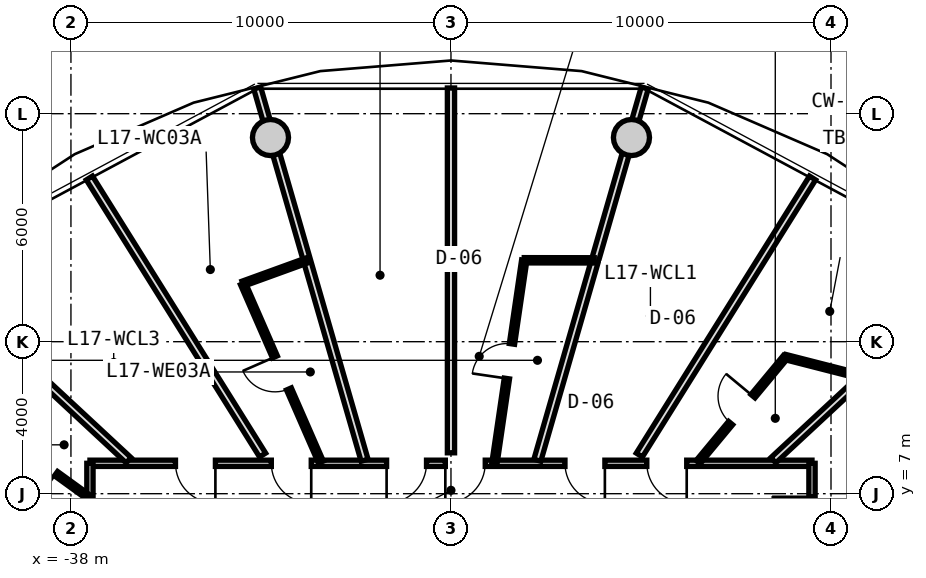
"""IFC4 building model, lengths in metres.
Left out: names, types, materials, properties, quantities, classifications, styles, units other than length and angle.
Written with IfcOpenShell. Run it as: python <this file> out.ifc"""

import sys

from ifc_helpers import new_model, si_unit, direction, frame, frame_2d, origin, origin_2d, place, context, subcontext, project, spatial, rectangle, circle, extrude, source, transform, mapped, element, fill, save


model = new_model("IFC4")
c1 = context("Model", 3, precision=1e-05, world=origin(), true_north=direction((0.0, 1.0)))
c2 = subcontext(c1, "Body", "Model", "MODEL_VIEW")
j1 = project(units=[si_unit("LENGTHUNIT", "METRE"), si_unit("PLANEANGLEUNIT", "RADIAN")], contexts=[c1])
p1 = place(None, origin())
s1 = spatial("IfcSite", under=j1, at=p1, CompositionType="ELEMENT")
p2 = place(p1, origin())
s2 = spatial("IfcBuilding", under=s1, at=p2, CompositionType="ELEMENT")
p3 = place(p2, frame((0.0, 0.0, 58.2)))
s3 = spatial("IfcBuildingStorey", under=s2, at=p3, CompositionType="ELEMENT", Elevation=58.2)
m1 = source(origin(), c2, "Body", "SweptSolid", [
    extrude(circle(Radius=0.475, at=origin_2d()), origin(), (0.0, 0.0, 1.0), 3.05),
])
for number, where, z_axis, x_axis in (
    (1, (-23.251, 16.373, 0.0), (0.0, 0.0, 1.0), (1.0, 0.0, 0.0)),
    (2, (-32.749, 16.373, 0.0), (0.0, 0.0, 1.0), (1.0, 0.0, 0.0)),
):
    element("IfcColumn", number, at=place(p3, frame(where, z_axis=z_axis, x_axis=x_axis)), inside=s3, PredefinedType="COLUMN", context=c2, shape_type="MappedRepresentation", body=[
        mapped(m1, transform((0.0, 0.0, 0.0), x_axis=(1.0, 0.0, 0.0), y_axis=(0.0, 1.0, 0.0), z_axis=(0.0, 0.0, 1.0), scale=1.0)),
    ])
m2 = source(origin(), c2, "Body", "SweptSolid", [
    extrude(rectangle(XDim=19.0, YDim=0.165, at=frame_2d((9.5, 0.0))), origin(), (0.0, 0.0, 1.0), 2.775),
])
p4 = place(p3, frame((-37.5, 7.8, 0.0), z_axis=(0.0, 0.0, 1.0), x_axis=(1.0, 0.0, 0.0)))
e3 = element("IfcWall", 3, at=p4, inside=s3, PredefinedType="PARTITIONING", context=c2, shape_type="MappedRepresentation", body=[
    mapped(m2, transform((0.0, 0.0, 0.0), x_axis=(1.0, 0.0, 0.0), y_axis=(0.0, 1.0, 0.0), z_axis=(0.0, 0.0, 1.0), scale=1.0)),
])
p5 = place(p4, frame((14.653, 0.0, 0.0)))
e4 = element("IfcOpeningElement", 4, at=p5, cuts=e3, PredefinedType="OPENING", context=c2, shape_type="SweptSolid", body=[
    extrude(rectangle(XDim=1.05, YDim=2.15, at=frame_2d((0.525, 1.075))), frame((0.0, 0.093, 0.0), z_axis=(0.0, -1.0, 0.0), x_axis=(1.0, 0.0, 0.0)), (0.0, 0.0, 1.0), 0.185),
])
p6 = place(p4, frame((12.5, 0.0, 0.0)))
e5 = element("IfcOpeningElement", 5, at=p6, cuts=e3, PredefinedType="OPENING", context=c2, shape_type="SweptSolid", body=[
    extrude(rectangle(XDim=1.05, YDim=2.15, at=frame_2d((0.525, 1.075))), frame((0.0, 0.093, 0.0), z_axis=(0.0, -1.0, 0.0), x_axis=(1.0, 0.0, 0.0)), (0.0, 0.0, 1.0), 0.185),
])
p7 = place(p4, frame((9.352, 0.0, 0.0)))
e6 = element("IfcOpeningElement", 6, at=p7, cuts=e3, PredefinedType="OPENING", context=c2, shape_type="SweptSolid", body=[
    extrude(rectangle(XDim=1.05, YDim=2.15, at=frame_2d((0.525, 1.075))), frame((0.0, 0.093, 0.0), z_axis=(0.0, -1.0, 0.0), x_axis=(1.0, 0.0, 0.0)), (0.0, 0.0, 1.0), 0.185),
])
p8 = place(p4, frame((7.806, 0.0, 0.0)))
e7 = element("IfcOpeningElement", 7, at=p8, cuts=e3, PredefinedType="OPENING", context=c2, shape_type="SweptSolid", body=[
    extrude(rectangle(XDim=1.05, YDim=2.15, at=frame_2d((0.525, 1.075))), frame((0.0, 0.093, 0.0), z_axis=(0.0, -1.0, 0.0), x_axis=(1.0, 0.0, 0.0)), (0.0, 0.0, 1.0), 0.185),
])
p9 = place(p4, frame((4.773, 0.0, 0.0)))
e8 = element("IfcOpeningElement", 8, at=p9, cuts=e3, PredefinedType="OPENING", context=c2, shape_type="SweptSolid", body=[
    extrude(rectangle(XDim=1.05, YDim=2.15, at=frame_2d((0.525, 1.075))), frame((0.0, 0.093, 0.0), z_axis=(0.0, -1.0, 0.0), x_axis=(1.0, 0.0, 0.0)), (0.0, 0.0, 1.0), 0.185),
])
p10 = place(p4, frame((2.251, 0.0, 0.0)))
e9 = element("IfcOpeningElement", 9, at=p10, cuts=e3, PredefinedType="OPENING", context=c2, shape_type="SweptSolid", body=[
    extrude(rectangle(XDim=1.05, YDim=2.15, at=frame_2d((0.525, 1.075))), frame((0.0, 0.093, 0.0), z_axis=(0.0, -1.0, 0.0), x_axis=(1.0, 0.0, 0.0)), (0.0, 0.0, 1.0), 0.185),
])
m3 = source(origin(), c2, "Body", "SweptSolid", [
    extrude(rectangle(XDim=15.6, YDim=0.165, at=frame_2d((7.8, 0.0))), origin(), (0.0, 0.0, 1.0), 2.775),
])
p11 = place(p3, frame((-37.5, -7.8, 0.0), z_axis=(0.0, 0.0, 1.0), x_axis=(0.0, 1.0, 0.0)))
e10 = element("IfcWall", 10, at=p11, inside=s3, PredefinedType="PARTITIONING", context=c2, shape_type="MappedRepresentation", body=[
    mapped(m3, transform((0.0, 0.0, 0.0), x_axis=(1.0, 0.0, 0.0), y_axis=(0.0, 1.0, 0.0), z_axis=(0.0, 0.0, 1.0), scale=1.0)),
])
p12 = place(p11, frame((7.812, 0.0, 0.0)))
e11 = element("IfcOpeningElement", 11, at=p12, cuts=e10, PredefinedType="OPENING", context=c2, shape_type="SweptSolid", body=[
    extrude(rectangle(XDim=1.05, YDim=2.15, at=frame_2d((0.525, 1.075))), frame((0.0, 0.093, 0.0), z_axis=(0.0, -1.0, 0.0), x_axis=(1.0, 0.0, 0.0)), (0.0, 0.0, 1.0), 0.185),
])
p13 = place(p11, frame((6.035, 0.0, 0.0)))
e12 = element("IfcOpeningElement", 12, at=p13, cuts=e10, PredefinedType="OPENING", context=c2, shape_type="SweptSolid", body=[
    extrude(rectangle(XDim=1.05, YDim=2.15, at=frame_2d((0.525, 1.075))), frame((0.0, 0.093, 0.0), z_axis=(0.0, -1.0, 0.0), x_axis=(1.0, 0.0, 0.0)), (0.0, 0.0, 1.0), 0.185),
])
p14 = place(p11, frame((2.826, 0.0, 0.0)))
e13 = element("IfcOpeningElement", 13, at=p14, cuts=e10, PredefinedType="OPENING", context=c2, shape_type="SweptSolid", body=[
    extrude(rectangle(XDim=1.05, YDim=2.15, at=frame_2d((0.525, 1.075))), frame((0.0, 0.093, 0.0), z_axis=(0.0, -1.0, 0.0), x_axis=(1.0, 0.0, 0.0)), (0.0, 0.0, 1.0), 0.185),
])
p15 = place(p11, frame((0.881, 0.0, 0.0)))
e14 = element("IfcOpeningElement", 14, at=p15, cuts=e10, PredefinedType="OPENING", context=c2, shape_type="SweptSolid", body=[
    extrude(rectangle(XDim=1.05, YDim=2.15, at=frame_2d((0.525, 1.075))), frame((0.0, 0.093, 0.0), z_axis=(0.0, -1.0, 0.0), x_axis=(1.0, 0.0, 0.0)), (0.0, 0.0, 1.0), 0.185),
])
p16 = place(p11, frame((13.293, 0.0, 0.0)))
e15 = element("IfcOpeningElement", 15, at=p16, cuts=e10, PredefinedType="OPENING", context=c2, shape_type="SweptSolid", body=[
    extrude(rectangle(XDim=1.05, YDim=2.15, at=frame_2d((0.525, 1.075))), frame((0.0, 0.093, 0.0), z_axis=(0.0, -1.0, 0.0), x_axis=(1.0, 0.0, 0.0)), (0.0, 0.0, 1.0), 0.185),
])
p17 = place(p11, frame((11.018, 0.0, 0.0)))
e16 = element("IfcOpeningElement", 16, at=p17, cuts=e10, PredefinedType="OPENING", context=c2, shape_type="SweptSolid", body=[
    extrude(rectangle(XDim=1.05, YDim=2.15, at=frame_2d((0.525, 1.075))), frame((0.0, 0.093, 0.0), z_axis=(0.0, -1.0, 0.0), x_axis=(1.0, 0.0, 0.0)), (0.0, 0.0, 1.0), 0.185),
])
p18 = place(p3, frame((-18.5, 7.8, 0.0), z_axis=(0.0, 0.0, 1.0), x_axis=(0.0, -1.0, 0.0)))
e17 = element("IfcWall", 17, at=p18, inside=s3, PredefinedType="PARTITIONING", context=c2, shape_type="MappedRepresentation", body=[
    mapped(m3, transform((0.0, 0.0, 0.0), x_axis=(1.0, 0.0, 0.0), y_axis=(0.0, 1.0, 0.0), z_axis=(0.0, 0.0, 1.0), scale=1.0)),
])
p19 = place(p18, frame((12.141, 0.0, 0.0)))
e18 = element("IfcOpeningElement", 18, at=p19, cuts=e17, PredefinedType="OPENING", context=c2, shape_type="SweptSolid", body=[
    extrude(rectangle(XDim=1.25, YDim=2.2, at=frame_2d((0.625, 1.1))), frame((0.0, 0.093, 0.0), z_axis=(0.0, -1.0, 0.0), x_axis=(1.0, 0.0, 0.0)), (0.0, 0.0, 1.0), 0.185),
])
p20 = place(p18, frame((7.175, 0.0, 0.0)))
e19 = element("IfcOpeningElement", 19, at=p20, cuts=e17, PredefinedType="OPENING", context=c2, shape_type="SweptSolid", body=[
    extrude(rectangle(XDim=1.25, YDim=2.2, at=frame_2d((0.625, 1.1))), frame((0.0, 0.093, 0.0), z_axis=(0.0, -1.0, 0.0), x_axis=(1.0, 0.0, 0.0)), (0.0, 0.0, 1.0), 0.185),
])
p21 = place(p18, frame((2.826, 0.0, 0.0)))
e20 = element("IfcOpeningElement", 20, at=p21, cuts=e17, PredefinedType="OPENING", context=c2, shape_type="SweptSolid", body=[
    extrude(rectangle(XDim=1.05, YDim=2.15, at=frame_2d((0.525, 1.075))), frame((0.0, 0.093, 0.0), z_axis=(0.0, -1.0, 0.0), x_axis=(1.0, 0.0, 0.0)), (0.0, 0.0, 1.0), 0.185),
])
p22 = place(p18, frame((0.881, 0.0, 0.0)))
e21 = element("IfcOpeningElement", 21, at=p22, cuts=e17, PredefinedType="OPENING", context=c2, shape_type="SweptSolid", body=[
    extrude(rectangle(XDim=1.05, YDim=2.15, at=frame_2d((0.525, 1.075))), frame((0.0, 0.093, 0.0), z_axis=(0.0, -1.0, 0.0), x_axis=(1.0, 0.0, 0.0)), (0.0, 0.0, 1.0), 0.185),
])
m4 = source(origin(), c2, "Body", "SweptSolid", [
    extrude(rectangle(XDim=7.435, YDim=0.19, at=frame_2d((3.717, 0.0))), origin(), (0.0, 0.0, 1.0), 2.225),
])
p23 = place(p3, frame((-19.517, 7.88, 0.0), z_axis=(0.0, 0.0, 1.0), x_axis=(0.732651956848, 0.680603489652, 0.0)))
e22 = element("IfcWall", 22, at=p23, inside=s3, PredefinedType="PARTITIONING", context=c2, shape_type="MappedRepresentation", body=[
    mapped(m4, transform((0.0, 0.0, 0.0), x_axis=(1.0, 0.0, 0.0), y_axis=(0.0, 1.0, 0.0), z_axis=(0.0, 0.0, 1.0), scale=1.0)),
])
m5 = source(origin(), c2, "Body", "SweptSolid", [
    extrude(rectangle(XDim=7.677, YDim=0.19, at=frame_2d((3.838, 0.0))), origin(), (0.0, 0.0, 1.0), 2.775),
])
p24 = place(p3, frame((-18.297, 5.231, 0.0), z_axis=(0.0, 0.0, 1.0), x_axis=(0.882725057546, 0.469889851753, 0.0)))
e23 = element("IfcWall", 23, at=p24, inside=s3, PredefinedType="PARTITIONING", context=c2, shape_type="MappedRepresentation", body=[
    mapped(m5, transform((0.0, 0.0, 0.0), x_axis=(1.0, 0.0, 0.0), y_axis=(0.0, 1.0, 0.0), z_axis=(0.0, 0.0, 1.0), scale=1.0)),
])
m6 = source(origin(), c2, "Body", "SweptSolid", [
    extrude(rectangle(XDim=10.196, YDim=0.19, at=frame_2d((5.098, 0.0))), origin(), (0.0, 0.0, 1.0), 2.225),
])
p25 = place(p3, frame((-25.727, 7.88, 0.0), z_axis=(0.0, 0.0, 1.0), x_axis=(0.277136420347, 0.960830580549, 0.0)))
e24 = element("IfcWall", 24, at=p25, inside=s3, PredefinedType="PARTITIONING", context=c2, shape_type="MappedRepresentation", body=[
    mapped(m6, transform((0.0, 0.0, 0.0), x_axis=(1.0, 0.0, 0.0), y_axis=(0.0, 1.0, 0.0), z_axis=(0.0, 0.0, 1.0), scale=1.0)),
])
m7 = source(origin(), c2, "Body", "SweptSolid", [
    extrude(rectangle(XDim=8.598, YDim=0.19, at=frame_2d((4.299, 0.0))), origin(), (0.0, 0.0, 1.0), 2.775),
])
p26 = place(p3, frame((-23.043, 8.017, 0.0), z_axis=(0.0, 0.0, 1.0), x_axis=(0.530039776395, 0.847972779893, 0.0)))
e25 = element("IfcWall", 25, at=p26, inside=s3, PredefinedType="PARTITIONING", context=c2, shape_type="MappedRepresentation", body=[
    mapped(m7, transform((0.0, 0.0, 0.0), x_axis=(1.0, 0.0, 0.0), y_axis=(0.0, 1.0, 0.0), z_axis=(0.0, 0.0, 1.0), scale=1.0)),
])
m8 = source(origin(), c2, "Body", "SweptSolid", [
    extrude(rectangle(XDim=3.594, YDim=0.14, at=frame_2d((1.797, 0.0))), origin(), (0.0, 0.0, 1.0), 2.775),
])
p27 = place(p3, frame((-21.496, 7.83, 0.0), z_axis=(0.0, 0.0, 1.0), x_axis=(0.639001147083, 0.769205781326, 0.0)))
e26 = element("IfcWall", 26, at=p27, inside=s3, PredefinedType="PARTITIONING", context=c2, shape_type="MappedRepresentation", body=[
    mapped(m8, transform((0.0, 0.0, 0.0), x_axis=(1.0, 0.0, 0.0), y_axis=(0.0, 1.0, 0.0), z_axis=(0.0, 0.0, 1.0), scale=1.0)),
])
p28 = place(p27, frame((1.337, 0.0, 0.0)))
e27 = element("IfcOpeningElement", 27, at=p28, cuts=e26, PredefinedType="OPENING", context=c2, shape_type="SweptSolid", body=[
    extrude(rectangle(XDim=0.92, YDim=2.1, at=frame_2d((0.46, 1.05))), frame((0.0, 0.08, 0.0), z_axis=(0.0, -1.0, 0.0), x_axis=(1.0, 0.0, 0.0)), (0.0, 0.0, 1.0), 0.16),
])
m9 = source(origin(), c2, "Body", "SweptSolid", [
    extrude(rectangle(XDim=2.062, YDim=0.14, at=frame_2d((1.031, 0.0))), origin(), (0.0, 0.0, 1.0), 2.415),
])
p29 = place(p3, frame((-19.199, 10.595, 0.0), z_axis=(0.0, 0.0, 1.0), x_axis=(0.968776253543, -0.247936626121, 0.0)))
e28 = element("IfcWall", 28, at=p29, inside=s3, PredefinedType="PARTITIONING", context=c2, shape_type="MappedRepresentation", body=[
    mapped(m9, transform((0.0, 0.0, 0.0), x_axis=(1.0, 0.0, 0.0), y_axis=(0.0, 1.0, 0.0), z_axis=(0.0, 0.0, 1.0), scale=1.0)),
])
p30 = place(p3, frame((-30.273, 7.88, 0.0), z_axis=(0.0, 0.0, 1.0), x_axis=(-0.277136420347, 0.960830580549, 0.0)))
e29 = element("IfcWall", 29, at=p30, inside=s3, PredefinedType="PARTITIONING", context=c2, shape_type="MappedRepresentation", body=[
    mapped(m6, transform((0.0, 0.0, 0.0), x_axis=(1.0, 0.0, 0.0), y_axis=(0.0, 1.0, 0.0), z_axis=(0.0, 0.0, 1.0), scale=1.0)),
])
m10 = source(origin(), c2, "Body", "SweptSolid", [
    extrude(rectangle(XDim=9.601, YDim=0.19, at=frame_2d((4.8, 0.0))), origin(), (0.0, 0.0, 1.0), 2.775),
])
p31 = place(p3, frame((-28.0, 8.076, 0.0), z_axis=(0.0, 0.0, 1.0), x_axis=(0.0, 1.0, 0.0)))
e30 = element("IfcWall", 30, at=p31, inside=s3, PredefinedType="PARTITIONING", context=c2, shape_type="MappedRepresentation", body=[
    mapped(m10, transform((0.0, 0.0, 0.0), x_axis=(1.0, 0.0, 0.0), y_axis=(0.0, 1.0, 0.0), z_axis=(0.0, 0.0, 1.0), scale=1.0)),
])
m11 = source(origin(), c2, "Body", "SweptSolid", [
    extrude(rectangle(XDim=5.37, YDim=0.14, at=frame_2d((2.685, 0.0))), origin(), (0.0, 0.0, 1.0), 2.775),
])
p32 = place(p3, frame((-26.851, 7.83, 0.0), z_axis=(0.0, 0.0, 1.0), x_axis=(0.145131397853, 0.989412389935, 0.0)))
e31 = element("IfcWall", 31, at=p32, inside=s3, PredefinedType="PARTITIONING", context=c2, shape_type="MappedRepresentation", body=[
    mapped(m11, transform((0.0, 0.0, 0.0), x_axis=(1.0, 0.0, 0.0), y_axis=(0.0, 1.0, 0.0), z_axis=(0.0, 0.0, 1.0), scale=1.0)),
])
p33 = place(p32, frame((2.225, 0.0, 0.0)))
e32 = element("IfcOpeningElement", 32, at=p33, cuts=e31, PredefinedType="OPENING", context=c2, shape_type="SweptSolid", body=[
    extrude(rectangle(XDim=0.92, YDim=2.1, at=frame_2d((0.46, 1.05))), frame((0.0, 0.08, 0.0), z_axis=(0.0, -1.0, 0.0), x_axis=(1.0, 0.0, 0.0)), (0.0, 0.0, 1.0), 0.16),
])
m12 = source(origin(), c2, "Body", "SweptSolid", [
    extrude(rectangle(XDim=1.843, YDim=0.14, at=frame_2d((0.921, 0.0))), origin(), (0.0, 0.0, 1.0), 2.775),
])
p34 = place(p3, frame((-26.072, 13.143, 0.0), z_axis=(0.0, 0.0, 1.0), x_axis=(0.999998937801, -0.001457531246, 0.0)))
e33 = element("IfcWall", 33, at=p34, inside=s3, PredefinedType="PARTITIONING", context=c2, shape_type="MappedRepresentation", body=[
    mapped(m12, transform((0.0, 0.0, 0.0), x_axis=(1.0, 0.0, 0.0), y_axis=(0.0, 1.0, 0.0), z_axis=(0.0, 0.0, 1.0), scale=1.0)),
])
p35 = place(p3, frame((-36.483, 7.88, 0.0), z_axis=(0.0, 0.0, 1.0), x_axis=(-0.732651956848, 0.680603489652, 0.0)))
e34 = element("IfcWall", 34, at=p35, inside=s3, PredefinedType="PARTITIONING", context=c2, shape_type="MappedRepresentation", body=[
    mapped(m4, transform((0.0, 0.0, 0.0), x_axis=(1.0, 0.0, 0.0), y_axis=(0.0, 1.0, 0.0), z_axis=(0.0, 0.0, 1.0), scale=1.0)),
])
p36 = place(p3, frame((-32.957, 8.017, 0.0), z_axis=(0.0, 0.0, 1.0), x_axis=(-0.530039776395, 0.847972779893, 0.0)))
e35 = element("IfcWall", 35, at=p36, inside=s3, PredefinedType="PARTITIONING", context=c2, shape_type="MappedRepresentation", body=[
    mapped(m7, transform((0.0, 0.0, 0.0), x_axis=(1.0, 0.0, 0.0), y_axis=(0.0, 1.0, 0.0), z_axis=(0.0, 0.0, 1.0), scale=1.0)),
])
m13 = source(origin(), c2, "Body", "SweptSolid", [
    extrude(rectangle(XDim=5.126, YDim=0.14, at=frame_2d((2.563, 0.0))), origin(), (0.0, 0.0, 1.0), 2.775),
])
p37 = place(p3, frame((-31.422, 7.83, 0.0), z_axis=(0.0, 0.0, 1.0), x_axis=(-0.400473994842, 0.916308124735, 0.0)))
e36 = element("IfcWall", 36, at=p37, inside=s3, PredefinedType="PARTITIONING", context=c2, shape_type="MappedRepresentation", body=[
    mapped(m13, transform((0.0, 0.0, 0.0), x_axis=(1.0, 0.0, 0.0), y_axis=(0.0, 1.0, 0.0), z_axis=(0.0, 0.0, 1.0), scale=1.0)),
])
p38 = place(p37, frame((2.103, 0.0, 0.0)))
e37 = element("IfcOpeningElement", 37, at=p38, cuts=e36, PredefinedType="OPENING", context=c2, shape_type="SweptSolid", body=[
    extrude(rectangle(XDim=0.92, YDim=2.1, at=frame_2d((0.46, 1.05))), frame((0.0, 0.08, 0.0), z_axis=(0.0, -1.0, 0.0), x_axis=(1.0, 0.0, 0.0)), (0.0, 0.0, 1.0), 0.16),
])
m14 = source(origin(), c2, "Body", "SweptSolid", [
    extrude(rectangle(XDim=1.811, YDim=0.14, at=frame_2d((0.906, 0.0))), origin(), (0.0, 0.0, 1.0), 2.775),
])
p39 = place(p3, frame((-33.475, 12.527, 0.0), z_axis=(0.0, 0.0, 1.0), x_axis=(0.940009682452, 0.341147764021, 0.0)))
e38 = element("IfcWall", 38, at=p39, inside=s3, PredefinedType="PARTITIONING", context=c2, shape_type="MappedRepresentation", body=[
    mapped(m14, transform((0.0, 0.0, 0.0), x_axis=(1.0, 0.0, 0.0), y_axis=(0.0, 1.0, 0.0), z_axis=(0.0, 0.0, 1.0), scale=1.0)),
])
p40 = place(p3, frame((-37.703, 5.231, 0.0), z_axis=(0.0, 0.0, 1.0), x_axis=(-0.882725057546, 0.469889851753, 0.0)))
e39 = element("IfcWall", 39, at=p40, inside=s3, PredefinedType="PARTITIONING", context=c2, shape_type="MappedRepresentation", body=[
    mapped(m5, transform((0.0, 0.0, 0.0), x_axis=(1.0, 0.0, 0.0), y_axis=(0.0, 1.0, 0.0), z_axis=(0.0, 0.0, 1.0), scale=1.0)),
])
m15 = source(origin(), c2, "Body", "SweptSolid", [
    extrude(rectangle(XDim=3.051, YDim=0.14, at=frame_2d((1.525, 0.0))), origin(), (0.0, 0.0, 1.0), 2.775),
])
p41 = place(p3, frame((-37.53, 6.903, 0.0), z_axis=(0.0, 0.0, 1.0), x_axis=(-0.809849031404, 0.586638343729, 0.0)))
e40 = element("IfcWall", 40, at=p41, inside=s3, PredefinedType="PARTITIONING", context=c2, shape_type="MappedRepresentation", body=[
    mapped(m15, transform((0.0, 0.0, 0.0), x_axis=(1.0, 0.0, 0.0), y_axis=(0.0, 1.0, 0.0), z_axis=(0.0, 0.0, 1.0), scale=1.0)),
])
p42 = place(p41, frame((1.065, 0.0, 0.0)))
e41 = element("IfcOpeningElement", 41, at=p42, cuts=e40, PredefinedType="OPENING", context=c2, shape_type="SweptSolid", body=[
    extrude(rectangle(XDim=0.92, YDim=2.1, at=frame_2d((0.46, 1.05))), frame((0.0, 0.08, 0.0), z_axis=(0.0, -1.0, 0.0), x_axis=(1.0, 0.0, 0.0)), (0.0, 0.0, 1.0), 0.16),
])
m16 = source(origin(), c2, "Body", "SweptSolid", [
    extrude(rectangle(XDim=1.05, YDim=2.15, at=frame_2d((0.525, 1.075))), frame((0.0, 0.025, 0.0), z_axis=(0.0, -1.0, 0.0), x_axis=(1.0, 0.0, 0.0)), (0.0, 0.0, 1.0), 0.05),
])
p43 = place(p22, frame((1.05, 0.0, 0.0), z_axis=(0.0, 0.0, 1.0), x_axis=(-1.0, 0.0, 0.0)))
e42 = element("IfcDoor", 42, at=p43, inside=s3, OperationType="SINGLE_SWING_RIGHT", PredefinedType="DOOR", context=c2, shape_type="MappedRepresentation", body=[
    mapped(m16, transform((0.0, 0.0, 0.0), x_axis=(1.0, 0.0, 0.0), y_axis=(0.0, 1.0, 0.0), z_axis=(0.0, 0.0, 1.0), scale=1.0)),
])
fill(e21, e42)
p44 = place(p5, frame((1.05, 0.0, 0.0), z_axis=(0.0, 0.0, 1.0), x_axis=(-1.0, 0.0, 0.0)))
e43 = element("IfcDoor", 43, at=p44, inside=s3, OperationType="SINGLE_SWING_LEFT", PredefinedType="DOOR", context=c2, shape_type="MappedRepresentation", body=[
    mapped(m16, transform((0.0, 0.0, 0.0), x_axis=(1.0, 0.0, 0.0), y_axis=(0.0, 1.0, 0.0), z_axis=(0.0, 0.0, 1.0), scale=1.0)),
])
fill(e4, e43)
m17 = source(origin(), c2, "Body", "SweptSolid", [
    extrude(rectangle(XDim=0.92, YDim=2.1, at=frame_2d((0.46, 1.05))), frame((0.0, 0.025, 0.0), z_axis=(0.0, -1.0, 0.0), x_axis=(1.0, 0.0, 0.0)), (0.0, 0.0, 1.0), 0.05),
])
p45 = place(p28, origin())
e44 = element("IfcDoor", 44, at=p45, inside=s3, OperationType="SINGLE_SWING_RIGHT", PredefinedType="DOOR", context=c2, shape_type="MappedRepresentation", body=[
    mapped(m17, transform((0.0, 0.0, 0.0), x_axis=(1.0, 0.0, 0.0), y_axis=(0.0, 1.0, 0.0), z_axis=(0.0, 0.0, 1.0), scale=1.0)),
])
fill(e27, e44)
p46 = place(p6, frame((1.05, 0.0, 0.0), z_axis=(0.0, 0.0, 1.0), x_axis=(-1.0, 0.0, 0.0)))
e45 = element("IfcDoor", 45, at=p46, inside=s3, OperationType="SINGLE_SWING_LEFT", PredefinedType="DOOR", context=c2, shape_type="MappedRepresentation", body=[
    mapped(m16, transform((0.0, 0.0, 0.0), x_axis=(1.0, 0.0, 0.0), y_axis=(0.0, 1.0, 0.0), z_axis=(0.0, 0.0, 1.0), scale=1.0)),
])
fill(e5, e45)
p47 = place(p7, frame((1.05, 0.0, 0.0), z_axis=(0.0, 0.0, 1.0), x_axis=(-1.0, 0.0, 0.0)))
e46 = element("IfcDoor", 46, at=p47, inside=s3, OperationType="SINGLE_SWING_RIGHT", PredefinedType="DOOR", context=c2, shape_type="MappedRepresentation", body=[
    mapped(m16, transform((0.0, 0.0, 0.0), x_axis=(1.0, 0.0, 0.0), y_axis=(0.0, 1.0, 0.0), z_axis=(0.0, 0.0, 1.0), scale=1.0)),
])
fill(e6, e46)
p48 = place(p33, origin())
e47 = element("IfcDoor", 47, at=p48, inside=s3, OperationType="SINGLE_SWING_LEFT", PredefinedType="DOOR", context=c2, shape_type="MappedRepresentation", body=[
    mapped(m17, transform((0.0, 0.0, 0.0), x_axis=(1.0, 0.0, 0.0), y_axis=(0.0, 1.0, 0.0), z_axis=(0.0, 0.0, 1.0), scale=1.0)),
])
fill(e32, e47)
p49 = place(p8, frame((1.05, 0.0, 0.0), z_axis=(0.0, 0.0, 1.0), x_axis=(-1.0, 0.0, 0.0)))
e48 = element("IfcDoor", 48, at=p49, inside=s3, OperationType="SINGLE_SWING_RIGHT", PredefinedType="DOOR", context=c2, shape_type="MappedRepresentation", body=[
    mapped(m16, transform((0.0, 0.0, 0.0), x_axis=(1.0, 0.0, 0.0), y_axis=(0.0, 1.0, 0.0), z_axis=(0.0, 0.0, 1.0), scale=1.0)),
])
fill(e7, e48)
p50 = place(p9, frame((1.05, 0.0, 0.0), z_axis=(0.0, 0.0, 1.0), x_axis=(-1.0, 0.0, 0.0)))
e49 = element("IfcDoor", 49, at=p50, inside=s3, OperationType="SINGLE_SWING_LEFT", PredefinedType="DOOR", context=c2, shape_type="MappedRepresentation", body=[
    mapped(m16, transform((0.0, 0.0, 0.0), x_axis=(1.0, 0.0, 0.0), y_axis=(0.0, 1.0, 0.0), z_axis=(0.0, 0.0, 1.0), scale=1.0)),
])
fill(e8, e49)
p51 = place(p38, origin())
e50 = element("IfcDoor", 50, at=p51, inside=s3, OperationType="SINGLE_SWING_RIGHT", PredefinedType="DOOR", context=c2, shape_type="MappedRepresentation", body=[
    mapped(m17, transform((0.0, 0.0, 0.0), x_axis=(1.0, 0.0, 0.0), y_axis=(0.0, 1.0, 0.0), z_axis=(0.0, 0.0, 1.0), scale=1.0)),
])
fill(e37, e50)
p52 = place(p10, frame((1.05, 0.0, 0.0), z_axis=(0.0, 0.0, 1.0), x_axis=(-1.0, 0.0, 0.0)))
e51 = element("IfcDoor", 51, at=p52, inside=s3, OperationType="SINGLE_SWING_LEFT", PredefinedType="DOOR", context=c2, shape_type="MappedRepresentation", body=[
    mapped(m16, transform((0.0, 0.0, 0.0), x_axis=(1.0, 0.0, 0.0), y_axis=(0.0, 1.0, 0.0), z_axis=(0.0, 0.0, 1.0), scale=1.0)),
])
fill(e9, e51)
p53 = place(p42, origin())
e52 = element("IfcDoor", 52, at=p53, inside=s3, OperationType="SINGLE_SWING_LEFT", PredefinedType="DOOR", context=c2, shape_type="MappedRepresentation", body=[
    mapped(m17, transform((0.0, 0.0, 0.0), x_axis=(1.0, 0.0, 0.0), y_axis=(0.0, 1.0, 0.0), z_axis=(0.0, 0.0, 1.0), scale=1.0)),
])
fill(e41, e52)
save(model, sys.argv[1])
